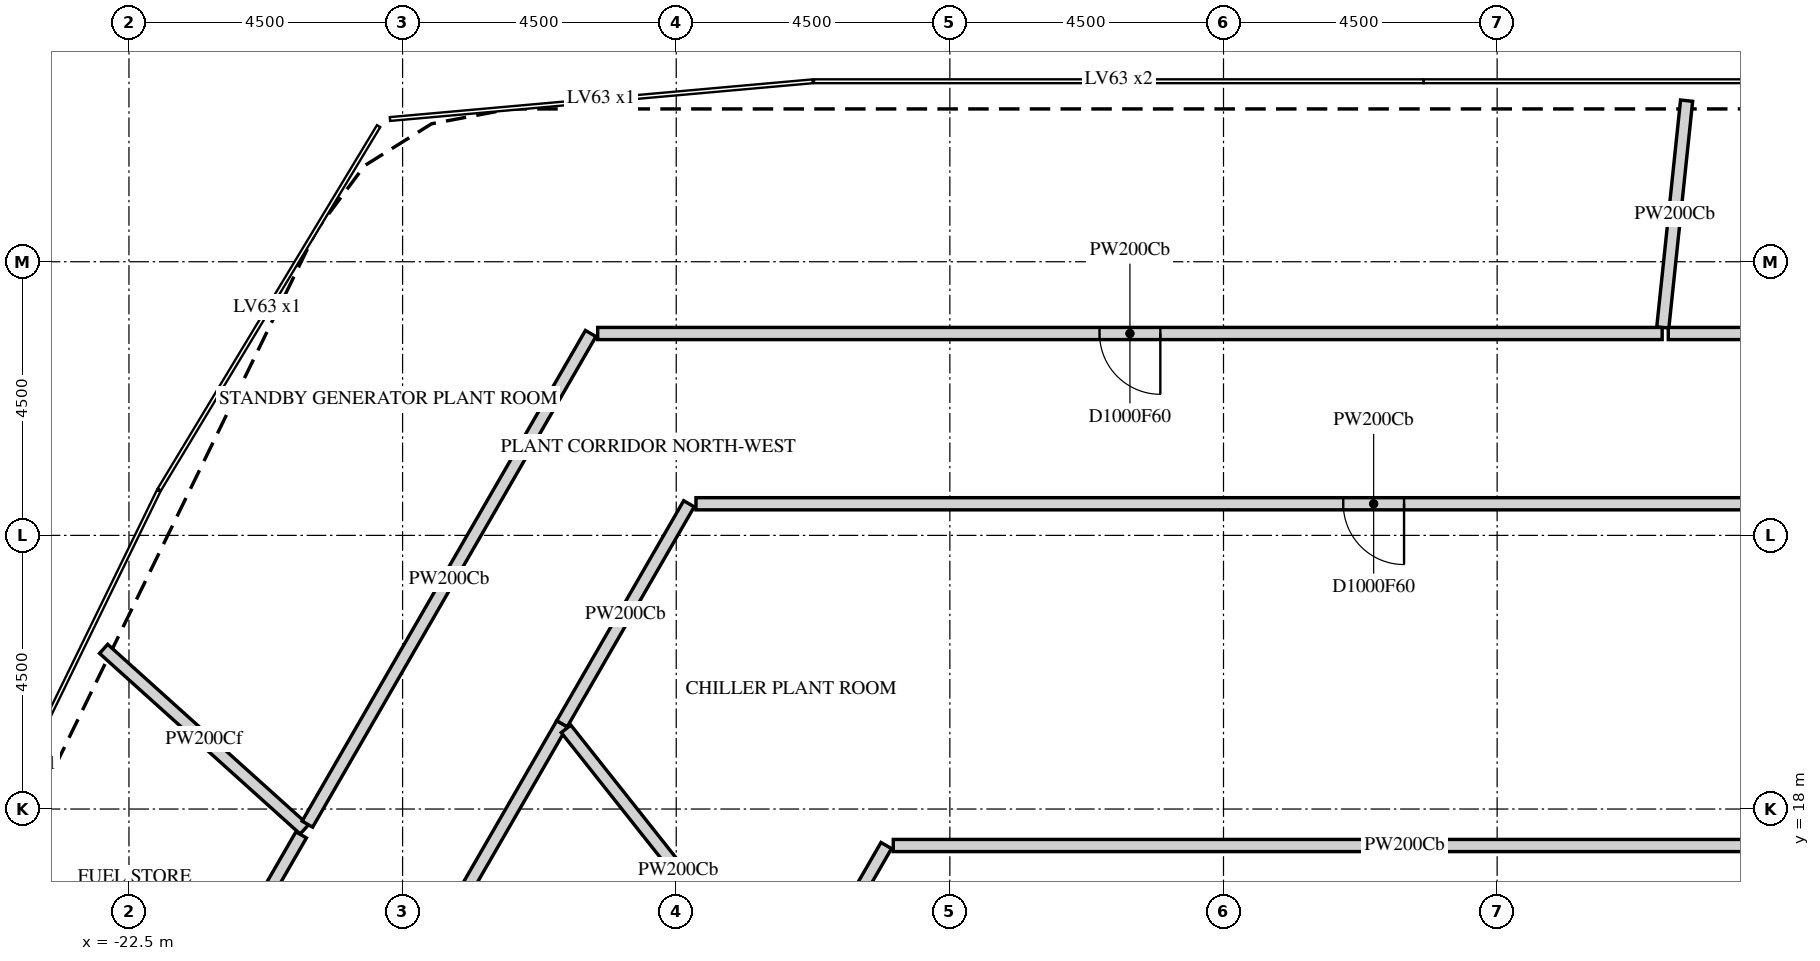
"""IFC4 building model, lengths in metres.
Left out: names, types, materials, properties, quantities, classifications, styles, units other than length and angle.
Written with IfcOpenShell. Run it as: python <this file> out.ifc"""

import sys

from ifc_helpers import new_model, si_unit, direction, frame, frame_2d, origin, place, context, subcontext, project, spatial, rectangle, extrude, element, fill, save


model = new_model("IFC4")
c1 = context("Model", 3, precision=1e-05, world=origin(), true_north=direction((0.0, 1.0)))
c2 = subcontext(c1, "Body", "Model", "MODEL_VIEW")
j1 = project(units=[si_unit("LENGTHUNIT", "METRE"), si_unit("PLANEANGLEUNIT", "RADIAN")], contexts=[c1])
p1 = place(None, origin())
s1 = spatial("IfcSite", under=j1, at=p1, CompositionType="ELEMENT")
p2 = place(p1, origin())
s2 = spatial("IfcBuilding", under=s1, at=p2, CompositionType="ELEMENT")
p3 = place(p2, frame((0.0, 0.0, 31.5)))
s3 = spatial("IfcBuildingStorey", under=s2, at=p3, CompositionType="ELEMENT", Elevation=31.5)
p4 = place(p3, frame((-15.379, 19.403, 0.0), z_axis=(0.0, 0.0, 1.0), x_axis=(-0.499997101594, -0.866027077174, 0.0)))
e1 = element("IfcWall", 1, at=p4, inside=s3, PredefinedType="PARTITIONING", context=c2, shape_type="SweptSolid", body=[
    extrude(rectangle(XDim=22.058, YDim=0.2, at=frame_2d((11.029, 0.0))), origin(), (0.0, 0.0, 1.0), 5.85),
])
p5 = place(p4, frame((10.529, 0.0, 0.0)))
e2 = element("IfcOpeningElement", 2, at=p5, cuts=e1, PredefinedType="OPENING", context=c2, shape_type="SweptSolid", body=[
    extrude(rectangle(XDim=1.0, YDim=2.1, at=frame_2d((0.5, 1.05))), frame((0.0, 0.11, 0.0), z_axis=(0.0, -1.0, 0.0), x_axis=(1.0, 0.0, 0.0)), (0.0, 0.0, 1.0), 0.22),
])
p6 = place(p3, frame((-22.917, 20.634, 0.0), z_axis=(0.0, 0.0, 1.0), x_axis=(0.74319570957, -0.669074089527, 0.0)))
e3 = element("IfcWall", 3, at=p6, inside=s3, PredefinedType="PARTITIONING", context=c2, shape_type="SweptSolid", body=[
    extrude(rectangle(XDim=4.44, YDim=0.2, at=frame_2d((2.22, 0.0))), origin(), (0.0, 0.0, 1.0), 5.088),
])
p7 = place(p3, frame((-29.641, 0.3, 0.0), z_axis=(0.0, 0.0, 1.0), x_axis=(0.49998168022, 0.866035980456, 0.0)))
e4 = element("IfcWall", 4, at=p7, inside=s3, PredefinedType="PARTITIONING", context=c2, shape_type="SweptSolid", body=[
    extrude(rectangle(XDim=19.947, YDim=0.2, at=frame_2d((9.973, 0.0))), origin(), (0.0, 0.0, 1.0), 5.85),
])
p8 = place(p7, frame((9.473, 0.0, 0.0)))
e5 = element("IfcOpeningElement", 5, at=p8, cuts=e4, PredefinedType="OPENING", context=c2, shape_type="SweptSolid", body=[
    extrude(rectangle(XDim=1.0, YDim=2.1, at=frame_2d((0.5, 1.05))), frame((0.0, 0.11, 0.0), z_axis=(0.0, -1.0, 0.0), x_axis=(1.0, 0.0, 0.0)), (0.0, 0.0, 1.0), 0.22),
])
p9 = place(p3, frame((-15.379, 19.403, 0.0), z_axis=(0.0, 0.0, 1.0), x_axis=(0.499936677724, 0.866061959831, 0.0)))
e6 = element("IfcWall", 6, at=p9, inside=s3, PredefinedType="PARTITIONING", context=c2, shape_type="SweptSolid", body=[
    extrude(rectangle(XDim=4.176, YDim=0.2, at=frame_2d((2.088, 0.0))), origin(), (0.0, 0.0, 1.0), 5.85),
])
p10 = place(p3, frame((-15.312, 19.319, 0.0), z_axis=(0.0, 0.0, 1.0), x_axis=(0.62121364233, -0.7836412512, 0.0)))
e7 = element("IfcWall", 7, at=p10, inside=s3, PredefinedType="PARTITIONING", context=c2, shape_type="SweptSolid", body=[
    extrude(rectangle(XDim=5.937, YDim=0.2, at=frame_2d((2.969, 0.0))), origin(), (0.0, 0.0, 1.0), 5.85),
])
p11 = place(p3, frame((-14.907, 25.82, 0.0), z_axis=(0.0, 0.0, 1.0), x_axis=(-0.500042271362, -0.866000997026, 0.0)))
e8 = element("IfcWall", 8, at=p11, inside=s3, PredefinedType="PARTITIONING", context=c2, shape_type="SweptSolid", body=[
    extrude(rectangle(XDim=9.317, YDim=0.2, at=frame_2d((4.659, 0.0))), origin(), (0.0, 0.0, 1.0), 5.85),
])
p12 = place(p3, frame((9.114, 23.02, 0.0), z_axis=(0.0, 0.0, 1.0), x_axis=(-1.0, 0.0, 0.0)))
e9 = element("IfcWall", 9, at=p12, inside=s3, PredefinedType="PARTITIONING", context=c2, shape_type="SweptSolid", body=[
    extrude(rectangle(XDim=22.29, YDim=0.2, at=frame_2d((11.145, 0.0))), origin(), (0.0, 0.0, 1.0), 5.85),
])
p13 = place(p12, frame((10.645, 0.0, 0.0)))
e10 = element("IfcOpeningElement", 10, at=p13, cuts=e9, PredefinedType="OPENING", context=c2, shape_type="SweptSolid", body=[
    extrude(rectangle(XDim=1.0, YDim=2.1, at=frame_2d((0.5, 1.05))), frame((0.0, 0.11, 0.0), z_axis=(0.0, -1.0, 0.0), x_axis=(1.0, 0.0, 0.0)), (0.0, 0.0, 1.0), 0.22),
])
p14 = place(p3, frame((-10.046, 17.4, 0.0), z_axis=(0.0, 0.0, 1.0), x_axis=(-0.499928067852, -0.866066929846, 0.0)))
e11 = element("IfcWall", 11, at=p14, inside=s3, PredefinedType="PARTITIONING", context=c2, shape_type="SweptSolid", body=[
    extrude(rectangle(XDim=3.049, YDim=0.2, at=frame_2d((1.525, 0.0))), origin(), (0.0, 0.0, 1.0), 5.85),
])
p15 = place(p3, frame((2.714, 25.82, 0.0), z_axis=(0.0, 0.0, 1.0), x_axis=(-1.0, 0.0, 0.0)))
e12 = element("IfcWall", 12, at=p15, inside=s3, PredefinedType="PARTITIONING", context=c2, shape_type="SweptSolid", body=[
    extrude(rectangle(XDim=17.506, YDim=0.2, at=frame_2d((8.753, 0.0))), origin(), (0.0, 0.0, 1.0), 5.85),
])
p16 = place(p15, frame((8.253, 0.0, 0.0)))
e13 = element("IfcOpeningElement", 13, at=p16, cuts=e12, PredefinedType="OPENING", context=c2, shape_type="SweptSolid", body=[
    extrude(rectangle(XDim=1.0, YDim=2.1, at=frame_2d((0.5, 1.05))), frame((0.0, 0.11, 0.0), z_axis=(0.0, -1.0, 0.0), x_axis=(1.0, 0.0, 0.0)), (0.0, 0.0, 1.0), 0.22),
])
p17 = place(p3, frame((3.116, 29.649, 0.0), z_axis=(0.0, 0.0, 1.0), x_axis=(-0.104376339502, -0.994537872457, 0.0)))
e14 = element("IfcWall", 14, at=p17, inside=s3, PredefinedType="PARTITIONING", context=c2, shape_type="SweptSolid", body=[
    extrude(rectangle(XDim=3.75, YDim=0.2, at=frame_2d((1.875, 0.0))), origin(), (0.0, 0.0, 1.0), 5.85),
])
p18 = place(p3, frame((6.889, 17.4, 0.0), z_axis=(0.0, 0.0, 1.0), x_axis=(-1.0, 0.0, 0.0)))
e15 = element("IfcWall", 15, at=p18, inside=s3, PredefinedType="PARTITIONING", context=c2, shape_type="SweptSolid", body=[
    extrude(rectangle(XDim=16.819, YDim=0.2, at=frame_2d((8.41, 0.0))), origin(), (0.0, 0.0, 1.0), 5.85),
])
p19 = place(p3, frame((2.814, 25.82, 0.0), z_axis=(0.0, 0.0, 1.0), x_axis=(1.0, 0.0, 0.0)))
e16 = element("IfcWall", 16, at=p19, inside=s3, PredefinedType="PARTITIONING", context=c2, shape_type="SweptSolid", body=[
    extrude(rectangle(XDim=11.747, YDim=0.2, at=frame_2d((5.873, 0.0))), origin(), (0.0, 0.0, 1.0), 5.85),
])
p20 = place(p19, frame((5.373, 0.0, 0.0)))
e17 = element("IfcOpeningElement", 17, at=p20, cuts=e16, PredefinedType="OPENING", context=c2, shape_type="SweptSolid", body=[
    extrude(rectangle(XDim=1.0, YDim=2.1, at=frame_2d((0.5, 1.05))), frame((0.0, 0.11, 0.0), z_axis=(0.0, -1.0, 0.0), x_axis=(1.0, 0.0, 0.0)), (0.0, 0.0, 1.0), 0.22),
])
p21 = place(p13, origin())
e18 = element("IfcDoor", 18, at=p21, inside=s3, OperationType="SINGLE_SWING_RIGHT", PredefinedType="DOOR", context=c2, shape_type="SweptSolid", body=[
    extrude(rectangle(XDim=1.0, YDim=2.1, at=frame_2d((0.5, 1.05))), frame((0.0, 0.025, 0.0), z_axis=(0.0, -1.0, 0.0), x_axis=(1.0, 0.0, 0.0)), (0.0, 0.0, 1.0), 0.05),
])
fill(e10, e18)
p22 = place(p16, origin())
e19 = element("IfcDoor", 19, at=p22, inside=s3, OperationType="SINGLE_SWING_RIGHT", PredefinedType="DOOR", context=c2, shape_type="SweptSolid", body=[
    extrude(rectangle(XDim=1.0, YDim=2.1, at=frame_2d((0.5, 1.05))), frame((0.0, 0.025, 0.0), z_axis=(0.0, -1.0, 0.0), x_axis=(1.0, 0.0, 0.0)), (0.0, 0.0, 1.0), 0.05),
])
fill(e13, e19)
save(model, sys.argv[1])
